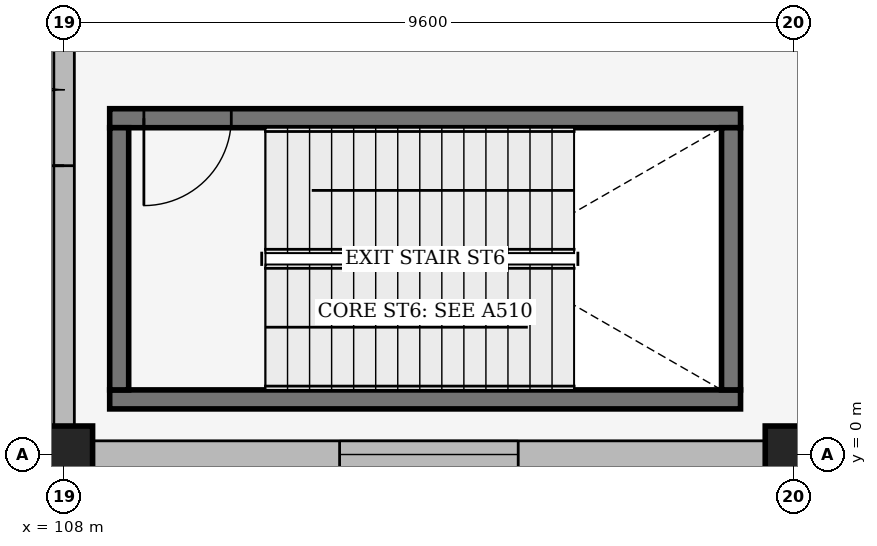
"""IFC4 building model, lengths in metres.
Left out: names, types, materials, properties, quantities, classifications, styles, units other than length and angle.
Written with IfcOpenShell. Run it as: python <this file> out.ifc"""

import sys

from ifc_helpers import new_model, si_unit, direction, frame, frame_2d, origin, origin_2d, place, context, subcontext, project, spatial, rectangle, extrude, element, fill, save


model = new_model("IFC4")
c1 = context("Model", 3, precision=1e-05, world=origin(), true_north=direction((0.0, 1.0)))
c2 = subcontext(c1, "Body", "Model", "MODEL_VIEW")
j1 = project(units=[si_unit("LENGTHUNIT", "METRE"), si_unit("PLANEANGLEUNIT", "RADIAN")], contexts=[c1])
p1 = place(None, origin())
s1 = spatial("IfcSite", under=j1, at=p1, CompositionType="ELEMENT")
p2 = place(p1, origin())
s2 = spatial("IfcBuilding", under=s1, at=p2, CompositionType="ELEMENT")
p3 = place(p2, origin())
s3 = spatial("IfcBuildingStorey", under=s2, at=p3, CompositionType="ELEMENT", Elevation=0.0)
for number, where, z_axis, x_axis in (
    (1, (108.0, 0.0, 0.0), (0.0, 0.0, 1.0), (1.0, 0.0, 0.0)),
    (2, (117.6, 0.0, 0.0), (0.0, 0.0, 1.0), (1.0, 0.0, 0.0)),
):
    element("IfcColumn", number, at=place(p3, frame(where, z_axis=z_axis, x_axis=x_axis)), inside=s3, PredefinedType="COLUMN", context=c2, shape_type="SweptSolid", body=[
        extrude(rectangle(XDim=0.75, YDim=0.75, at=origin_2d()), origin(), (0.0, 0.0, 1.0), 5.4),
    ])
p4 = place(p3, frame((108.0, 9.217, 0.0), z_axis=(0.0, 0.0, 1.0), x_axis=(0.0, -1.0, 0.0)))
e3 = element("IfcWall", 3, at=p4, inside=s3, PredefinedType="SOLIDWALL", context=c2, shape_type="SweptSolid", body=[
    extrude(rectangle(XDim=8.834, YDim=0.27, at=frame_2d((4.417, 0.0))), origin(), (0.0, 0.0, 1.0), 4.663),
])
p5 = place(p4, frame((5.417, 0.0, 0.0), z_axis=(0.0, 0.0, 1.0), x_axis=(-1.0, 0.0, 0.0)))
e4 = element("IfcOpeningElement", 4, at=p5, cuts=e3, PredefinedType="OPENING", context=c2, shape_type="SweptSolid", body=[
    extrude(rectangle(XDim=2.0, YDim=2.5, at=frame_2d((1.0, 1.25))), frame((0.0, 0.145, 0.0), z_axis=(0.0, -1.0, 0.0), x_axis=(1.0, 0.0, 0.0)), (0.0, 0.0, 1.0), 0.29),
])
p6 = place(p3, frame((108.383, 0.0, 0.0), z_axis=(0.0, 0.0, 1.0), x_axis=(1.0, 0.0, 0.0)))
e5 = element("IfcWall", 5, at=p6, inside=s3, PredefinedType="SOLIDWALL", context=c2, shape_type="SweptSolid", body=[
    extrude(rectangle(XDim=8.834, YDim=0.36, at=frame_2d((4.417, 0.0))), origin(), (0.0, 0.0, 1.0), 4.813),
])
p7 = place(p6, frame((3.242, 0.0, 0.95)))
e6 = element("IfcOpeningElement", 6, at=p7, cuts=e5, PredefinedType="OPENING", context=c2, shape_type="SweptSolid", body=[
    extrude(rectangle(XDim=2.35, YDim=2.1, at=frame_2d((1.175, 1.05))), frame((0.0, 0.19, 0.0), z_axis=(0.0, -1.0, 0.0), x_axis=(1.0, 0.0, 0.0)), (0.0, 0.0, 1.0), 0.38),
])
p8 = place(p3, frame((108.6, 0.725, 0.0), z_axis=(0.0, 0.0, 1.0), x_axis=(1.0, 0.0, 0.0)))
e7 = element("IfcWall", 7, at=p8, inside=s3, PredefinedType="SHEAR", context=c2, shape_type="SweptSolid", body=[
    extrude(rectangle(XDim=8.3, YDim=0.25, at=frame_2d((4.15, 0.0))), origin(), (0.0, 0.0, 1.0), 5.05),
])
p9 = place(p3, frame((116.9, 4.425, 0.0), z_axis=(0.0, 0.0, 1.0), x_axis=(-1.0, 0.0, 0.0)))
e8 = element("IfcWall", 8, at=p9, inside=s3, PredefinedType="SHEAR", context=c2, shape_type="SweptSolid", body=[
    extrude(rectangle(XDim=8.3, YDim=0.25, at=frame_2d((4.15, 0.0))), origin(), (0.0, 0.0, 1.0), 5.05),
])
p10 = place(p9, frame((7.85, 0.0, 0.0), z_axis=(0.0, 0.0, 1.0), x_axis=(-1.0, 0.0, 0.0)))
e9 = element("IfcOpeningElement", 9, at=p10, cuts=e8, PredefinedType="OPENING", context=c2, shape_type="SweptSolid", body=[
    extrude(rectangle(XDim=1.15, YDim=2.2, at=frame_2d((0.575, 1.1))), frame((0.0, 0.135, 0.0), z_axis=(0.0, -1.0, 0.0), x_axis=(1.0, 0.0, 0.0)), (0.0, 0.0, 1.0), 0.27),
])
for number, where, z_axis, x_axis in (
    (10, (108.725, 4.3, 0.0), (0.0, 0.0, 1.0), (0.0, -1.0, 0.0)),
    (11, (116.775, 0.85, 0.0), (0.0, 0.0, 1.0), (0.0, 1.0, 0.0)),
):
    element("IfcWall", number, at=place(p3, frame(where, z_axis=z_axis, x_axis=x_axis)), inside=s3, PredefinedType="SHEAR", context=c2, shape_type="SweptSolid", body=[
        extrude(rectangle(XDim=3.45, YDim=0.25, at=frame_2d((1.725, 0.0))), origin(), (0.0, 0.0, 1.0), 5.05),
    ])
p11 = place(p5, origin())
e12 = element("IfcDoor", 12, at=p11, inside=s3, OperationType="DOUBLE_DOOR_SINGLE_SWING", PredefinedType="DOOR", context=c2, shape_type="SweptSolid", body=[
    extrude(rectangle(XDim=2.0, YDim=2.5, at=frame_2d((1.0, 1.25))), frame((0.0, 0.025, 0.0), z_axis=(0.0, -1.0, 0.0), x_axis=(1.0, 0.0, 0.0)), (0.0, 0.0, 1.0), 0.05),
])
fill(e4, e12)
p12 = place(p7, origin())
e13 = element("IfcWindow", 13, at=p12, inside=s3, PartitioningType="SINGLE_PANEL", PredefinedType="WINDOW", context=c2, shape_type="SweptSolid", body=[
    extrude(rectangle(XDim=2.35, YDim=2.1, at=frame_2d((1.175, 1.05))), frame((0.0, 0.03, 0.0), z_axis=(0.0, -1.0, 0.0), x_axis=(1.0, 0.0, 0.0)), (0.0, 0.0, 1.0), 0.06),
])
fill(e6, e13)
p13 = place(p10, origin())
e14 = element("IfcDoor", 14, at=p13, inside=s3, OperationType="SINGLE_SWING_LEFT", PredefinedType="DOOR", context=c2, shape_type="SweptSolid", body=[
    extrude(rectangle(XDim=1.15, YDim=2.2, at=frame_2d((0.575, 1.1))), frame((0.0, 0.025, 0.0), z_axis=(0.0, -1.0, 0.0), x_axis=(1.0, 0.0, 0.0)), (0.0, 0.0, 1.0), 0.05),
])
fill(e9, e14)
save(model, sys.argv[1])
